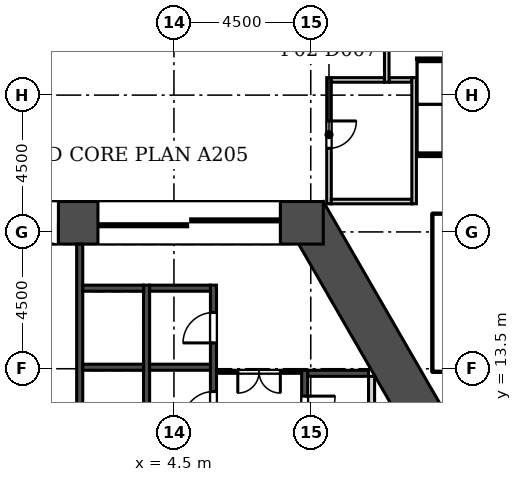
"""IFC4 building model, lengths in metres.
Left out: names, types, materials, properties, quantities, classifications, styles, units other than length and angle.
Written with IfcOpenShell. Run it as: python <this file> out.ifc"""

import sys

from ifc_helpers import new_model, si_unit, direction, frame, frame_2d, origin, place, context, subcontext, project, spatial, rectangle, extrude, element, fill, save


model = new_model("IFC4")
c1 = context("Model", 3, precision=1e-05, world=origin(), true_north=direction((0.0, 1.0)))
c2 = subcontext(c1, "Body", "Model", "MODEL_VIEW")
j1 = project(units=[si_unit("LENGTHUNIT", "METRE"), si_unit("PLANEANGLEUNIT", "RADIAN")], contexts=[c1])
p1 = place(None, origin())
s1 = spatial("IfcSite", under=j1, at=p1, CompositionType="ELEMENT")
p2 = place(p1, origin())
s2 = spatial("IfcBuilding", under=s1, at=p2, CompositionType="ELEMENT")
p3 = place(p2, frame((0.0, 0.0, 14.0)))
s3 = spatial("IfcBuildingStorey", under=s2, at=p3, CompositionType="ELEMENT", Elevation=14.0)
p4 = place(p3, frame((13.394, 10.703, 0.0), z_axis=(0.0, 0.0, 1.0), x_axis=(-0.50000187635, 0.866024320471, 0.0)))
e1 = element("IfcWall", 1, at=p4, inside=s3, PredefinedType="SHEAR", context=c2, shape_type="SweptSolid", body=[
    extrude(rectangle(XDim=9.177, YDim=1.4, at=frame_2d((4.588, 0.0))), origin(), (0.0, 0.0, 1.0), 6.0),
])
p5 = place(p3, frame((9.412, 18.3, 0.0), z_axis=(0.0, 0.0, 1.0), x_axis=(-1.0, 0.0, 0.0)))
e2 = element("IfcWall", 2, at=p5, inside=s3, PredefinedType="SHEAR", context=c2, shape_type="SweptSolid", body=[
    extrude(rectangle(XDim=18.823, YDim=1.4, at=frame_2d((9.412, 0.0))), origin(), (0.0, 0.0, 1.0), 6.0),
])
p6 = place(p5, frame((8.711, 0.0, 0.0)))
e3 = element("IfcOpeningElement", 3, at=p6, cuts=e2, PredefinedType="OPENING", context=c2, shape_type="SweptSolid", body=[
    extrude(rectangle(XDim=1.4, YDim=2.1, at=frame_2d((0.7, 1.05))), frame((0.0, 0.71, 0.0), z_axis=(0.0, -1.0, 0.0), x_axis=(1.0, 0.0, 0.0)), (0.0, 0.0, 1.0), 1.42),
])
p7 = place(p5, frame((11.412, 0.0, 0.0)))
e4 = element("IfcOpeningElement", 4, at=p7, cuts=e2, PredefinedType="OPENING", context=c2, shape_type="SweptSolid", body=[
    extrude(rectangle(XDim=6.0, YDim=2.4, at=frame_2d((3.0, 1.2))), frame((0.0, 0.71, 0.0), z_axis=(0.0, -1.0, 0.0), x_axis=(1.0, 0.0, 0.0)), (0.0, 0.0, 1.0), 1.42),
])
p8 = place(p5, frame((1.412, 0.0, 0.0)))
e5 = element("IfcOpeningElement", 5, at=p8, cuts=e2, PredefinedType="OPENING", context=c2, shape_type="SweptSolid", body=[
    extrude(rectangle(XDim=6.0, YDim=2.4, at=frame_2d((3.0, 1.2))), frame((0.0, 0.71, 0.0), z_axis=(0.0, -1.0, 0.0), x_axis=(1.0, 0.0, 0.0)), (0.0, 0.0, 1.0), 1.42),
])
p9 = place(p3, frame((42.853, 8.575, 0.0), z_axis=(0.0, 0.0, 1.0), x_axis=(-0.49999894854, 0.866026010844, 0.0)))
e6 = element("IfcWall", 6, at=p9, inside=s3, PredefinedType="SOLIDWALL", context=c2, shape_type="SweptSolid", body=[
    extrude(rectangle(XDim=76.0, YDim=0.34, at=frame_2d((38.0, 0.0))), origin(), (0.0, 0.0, 1.0), 5.7),
])
p10 = place(p9, frame((1.058, 0.0, 0.9)))
e7 = element("IfcOpeningElement", 7, at=p10, cuts=e6, PredefinedType="OPENING", context=c2, shape_type="SweptSolid", body=[
    extrude(rectangle(XDim=1.885, YDim=3.5, at=frame_2d((0.942, 1.75))), frame((0.0, 0.18, 0.0), z_axis=(0.0, -1.0, 0.0), x_axis=(1.0, 0.0, 0.0)), (0.0, 0.0, 1.0), 0.36),
])
p11 = place(p9, frame((4.058, 0.0, 0.9)))
e8 = element("IfcOpeningElement", 8, at=p11, cuts=e6, PredefinedType="OPENING", context=c2, shape_type="SweptSolid", body=[
    extrude(rectangle(XDim=1.885, YDim=3.5, at=frame_2d((0.942, 1.75))), frame((0.0, 0.18, 0.0), z_axis=(0.0, -1.0, 0.0), x_axis=(1.0, 0.0, 0.0)), (0.0, 0.0, 1.0), 0.36),
])
p12 = place(p9, frame((7.058, 0.0, 0.9)))
e9 = element("IfcOpeningElement", 9, at=p12, cuts=e6, PredefinedType="OPENING", context=c2, shape_type="SweptSolid", body=[
    extrude(rectangle(XDim=1.885, YDim=3.5, at=frame_2d((0.942, 1.75))), frame((0.0, 0.18, 0.0), z_axis=(0.0, -1.0, 0.0), x_axis=(1.0, 0.0, 0.0)), (0.0, 0.0, 1.0), 0.36),
])
p13 = place(p9, frame((10.058, 0.0, 0.9)))
e10 = element("IfcOpeningElement", 10, at=p13, cuts=e6, PredefinedType="OPENING", context=c2, shape_type="SweptSolid", body=[
    extrude(rectangle(XDim=1.885, YDim=3.5, at=frame_2d((0.942, 1.75))), frame((0.0, 0.18, 0.0), z_axis=(0.0, -1.0, 0.0), x_axis=(1.0, 0.0, 0.0)), (0.0, 0.0, 1.0), 0.36),
])
p14 = place(p9, frame((13.058, 0.0, 0.9)))
e11 = element("IfcOpeningElement", 11, at=p14, cuts=e6, PredefinedType="OPENING", context=c2, shape_type="SweptSolid", body=[
    extrude(rectangle(XDim=1.885, YDim=3.5, at=frame_2d((0.942, 1.75))), frame((0.0, 0.18, 0.0), z_axis=(0.0, -1.0, 0.0), x_axis=(1.0, 0.0, 0.0)), (0.0, 0.0, 1.0), 0.36),
])
p15 = place(p9, frame((16.058, 0.0, 0.9)))
e12 = element("IfcOpeningElement", 12, at=p15, cuts=e6, PredefinedType="OPENING", context=c2, shape_type="SweptSolid", body=[
    extrude(rectangle(XDim=1.885, YDim=3.5, at=frame_2d((0.942, 1.75))), frame((0.0, 0.18, 0.0), z_axis=(0.0, -1.0, 0.0), x_axis=(1.0, 0.0, 0.0)), (0.0, 0.0, 1.0), 0.36),
])
p16 = place(p9, frame((19.058, 0.0, 0.9)))
e13 = element("IfcOpeningElement", 13, at=p16, cuts=e6, PredefinedType="OPENING", context=c2, shape_type="SweptSolid", body=[
    extrude(rectangle(XDim=1.885, YDim=3.5, at=frame_2d((0.942, 1.75))), frame((0.0, 0.18, 0.0), z_axis=(0.0, -1.0, 0.0), x_axis=(1.0, 0.0, 0.0)), (0.0, 0.0, 1.0), 0.36),
])
p17 = place(p9, frame((22.058, 0.0, 0.9)))
e14 = element("IfcOpeningElement", 14, at=p17, cuts=e6, PredefinedType="OPENING", context=c2, shape_type="SweptSolid", body=[
    extrude(rectangle(XDim=1.885, YDim=3.5, at=frame_2d((0.942, 1.75))), frame((0.0, 0.18, 0.0), z_axis=(0.0, -1.0, 0.0), x_axis=(1.0, 0.0, 0.0)), (0.0, 0.0, 1.0), 0.36),
])
p18 = place(p9, frame((25.058, 0.0, 0.9)))
e15 = element("IfcOpeningElement", 15, at=p18, cuts=e6, PredefinedType="OPENING", context=c2, shape_type="SweptSolid", body=[
    extrude(rectangle(XDim=1.885, YDim=3.5, at=frame_2d((0.942, 1.75))), frame((0.0, 0.18, 0.0), z_axis=(0.0, -1.0, 0.0), x_axis=(1.0, 0.0, 0.0)), (0.0, 0.0, 1.0), 0.36),
])
p19 = place(p9, frame((28.058, 0.0, 0.9)))
e16 = element("IfcOpeningElement", 16, at=p19, cuts=e6, PredefinedType="OPENING", context=c2, shape_type="SweptSolid", body=[
    extrude(rectangle(XDim=1.885, YDim=3.5, at=frame_2d((0.942, 1.75))), frame((0.0, 0.18, 0.0), z_axis=(0.0, -1.0, 0.0), x_axis=(1.0, 0.0, 0.0)), (0.0, 0.0, 1.0), 0.36),
])
p20 = place(p9, frame((31.058, 0.0, 0.9)))
e17 = element("IfcOpeningElement", 17, at=p20, cuts=e6, PredefinedType="OPENING", context=c2, shape_type="SweptSolid", body=[
    extrude(rectangle(XDim=1.885, YDim=3.5, at=frame_2d((0.942, 1.75))), frame((0.0, 0.18, 0.0), z_axis=(0.0, -1.0, 0.0), x_axis=(1.0, 0.0, 0.0)), (0.0, 0.0, 1.0), 0.36),
])
p21 = place(p9, frame((34.058, 0.0, 0.9)))
e18 = element("IfcOpeningElement", 18, at=p21, cuts=e6, PredefinedType="OPENING", context=c2, shape_type="SweptSolid", body=[
    extrude(rectangle(XDim=1.885, YDim=3.5, at=frame_2d((0.942, 1.75))), frame((0.0, 0.18, 0.0), z_axis=(0.0, -1.0, 0.0), x_axis=(1.0, 0.0, 0.0)), (0.0, 0.0, 1.0), 0.36),
])
p22 = place(p9, frame((37.058, 0.0, 0.9)))
e19 = element("IfcOpeningElement", 19, at=p22, cuts=e6, PredefinedType="OPENING", context=c2, shape_type="SweptSolid", body=[
    extrude(rectangle(XDim=1.885, YDim=3.5, at=frame_2d((0.942, 1.75))), frame((0.0, 0.18, 0.0), z_axis=(0.0, -1.0, 0.0), x_axis=(1.0, 0.0, 0.0)), (0.0, 0.0, 1.0), 0.36),
])
p23 = place(p9, frame((40.058, 0.0, 0.9)))
e20 = element("IfcOpeningElement", 20, at=p23, cuts=e6, PredefinedType="OPENING", context=c2, shape_type="SweptSolid", body=[
    extrude(rectangle(XDim=1.885, YDim=3.5, at=frame_2d((0.942, 1.75))), frame((0.0, 0.18, 0.0), z_axis=(0.0, -1.0, 0.0), x_axis=(1.0, 0.0, 0.0)), (0.0, 0.0, 1.0), 0.36),
])
p24 = place(p9, frame((43.058, 0.0, 0.9)))
e21 = element("IfcOpeningElement", 21, at=p24, cuts=e6, PredefinedType="OPENING", context=c2, shape_type="SweptSolid", body=[
    extrude(rectangle(XDim=1.885, YDim=3.5, at=frame_2d((0.942, 1.75))), frame((0.0, 0.18, 0.0), z_axis=(0.0, -1.0, 0.0), x_axis=(1.0, 0.0, 0.0)), (0.0, 0.0, 1.0), 0.36),
])
p25 = place(p9, frame((46.058, 0.0, 0.9)))
e22 = element("IfcOpeningElement", 22, at=p25, cuts=e6, PredefinedType="OPENING", context=c2, shape_type="SweptSolid", body=[
    extrude(rectangle(XDim=1.885, YDim=3.5, at=frame_2d((0.942, 1.75))), frame((0.0, 0.18, 0.0), z_axis=(0.0, -1.0, 0.0), x_axis=(1.0, 0.0, 0.0)), (0.0, 0.0, 1.0), 0.36),
])
p26 = place(p9, frame((49.058, 0.0, 0.9)))
e23 = element("IfcOpeningElement", 23, at=p26, cuts=e6, PredefinedType="OPENING", context=c2, shape_type="SweptSolid", body=[
    extrude(rectangle(XDim=1.885, YDim=3.5, at=frame_2d((0.942, 1.75))), frame((0.0, 0.18, 0.0), z_axis=(0.0, -1.0, 0.0), x_axis=(1.0, 0.0, 0.0)), (0.0, 0.0, 1.0), 0.36),
])
p27 = place(p9, frame((52.058, 0.0, 0.9)))
e24 = element("IfcOpeningElement", 24, at=p27, cuts=e6, PredefinedType="OPENING", context=c2, shape_type="SweptSolid", body=[
    extrude(rectangle(XDim=1.885, YDim=3.5, at=frame_2d((0.942, 1.75))), frame((0.0, 0.18, 0.0), z_axis=(0.0, -1.0, 0.0), x_axis=(1.0, 0.0, 0.0)), (0.0, 0.0, 1.0), 0.36),
])
p28 = place(p9, frame((55.058, 0.0, 0.9)))
e25 = element("IfcOpeningElement", 25, at=p28, cuts=e6, PredefinedType="OPENING", context=c2, shape_type="SweptSolid", body=[
    extrude(rectangle(XDim=1.885, YDim=3.5, at=frame_2d((0.942, 1.75))), frame((0.0, 0.18, 0.0), z_axis=(0.0, -1.0, 0.0), x_axis=(1.0, 0.0, 0.0)), (0.0, 0.0, 1.0), 0.36),
])
p29 = place(p9, frame((58.058, 0.0, 0.9)))
e26 = element("IfcOpeningElement", 26, at=p29, cuts=e6, PredefinedType="OPENING", context=c2, shape_type="SweptSolid", body=[
    extrude(rectangle(XDim=1.885, YDim=3.5, at=frame_2d((0.942, 1.75))), frame((0.0, 0.18, 0.0), z_axis=(0.0, -1.0, 0.0), x_axis=(1.0, 0.0, 0.0)), (0.0, 0.0, 1.0), 0.36),
])
p30 = place(p9, frame((61.058, 0.0, 0.9)))
e27 = element("IfcOpeningElement", 27, at=p30, cuts=e6, PredefinedType="OPENING", context=c2, shape_type="SweptSolid", body=[
    extrude(rectangle(XDim=1.885, YDim=3.5, at=frame_2d((0.942, 1.75))), frame((0.0, 0.18, 0.0), z_axis=(0.0, -1.0, 0.0), x_axis=(1.0, 0.0, 0.0)), (0.0, 0.0, 1.0), 0.36),
])
p31 = place(p9, frame((64.058, 0.0, 0.9)))
e28 = element("IfcOpeningElement", 28, at=p31, cuts=e6, PredefinedType="OPENING", context=c2, shape_type="SweptSolid", body=[
    extrude(rectangle(XDim=1.885, YDim=3.5, at=frame_2d((0.942, 1.75))), frame((0.0, 0.18, 0.0), z_axis=(0.0, -1.0, 0.0), x_axis=(1.0, 0.0, 0.0)), (0.0, 0.0, 1.0), 0.36),
])
p32 = place(p9, frame((67.058, 0.0, 0.9)))
e29 = element("IfcOpeningElement", 29, at=p32, cuts=e6, PredefinedType="OPENING", context=c2, shape_type="SweptSolid", body=[
    extrude(rectangle(XDim=1.885, YDim=3.5, at=frame_2d((0.942, 1.75))), frame((0.0, 0.18, 0.0), z_axis=(0.0, -1.0, 0.0), x_axis=(1.0, 0.0, 0.0)), (0.0, 0.0, 1.0), 0.36),
])
p33 = place(p9, frame((70.058, 0.0, 0.9)))
e30 = element("IfcOpeningElement", 30, at=p33, cuts=e6, PredefinedType="OPENING", context=c2, shape_type="SweptSolid", body=[
    extrude(rectangle(XDim=1.885, YDim=3.5, at=frame_2d((0.942, 1.75))), frame((0.0, 0.18, 0.0), z_axis=(0.0, -1.0, 0.0), x_axis=(1.0, 0.0, 0.0)), (0.0, 0.0, 1.0), 0.36),
])
p34 = place(p9, frame((73.058, 0.0, 0.9)))
e31 = element("IfcOpeningElement", 31, at=p34, cuts=e6, PredefinedType="OPENING", context=c2, shape_type="SweptSolid", body=[
    extrude(rectangle(XDim=1.885, YDim=3.5, at=frame_2d((0.942, 1.75))), frame((0.0, 0.18, 0.0), z_axis=(0.0, -1.0, 0.0), x_axis=(1.0, 0.0, 0.0)), (0.0, 0.0, 1.0), 0.36),
])
p35 = place(p3, frame((11.0, 5.85, 0.0), z_axis=(0.0, 0.0, 1.0), x_axis=(0.0, 1.0, 0.0)))
e32 = element("IfcWall", 32, at=p35, inside=s3, PredefinedType="SOLIDWALL", context=c2, shape_type="SweptSolid", body=[
    extrude(rectangle(XDim=7.4, YDim=0.2, at=frame_2d((3.7, 0.0))), origin(), (0.0, 0.0, 1.0), 5.7),
])
p36 = place(p3, frame((8.8, 8.25, -0.3), z_axis=(0.0, 0.0, 1.0), x_axis=(0.0, 1.0, 0.0)))
e33 = element("IfcWall", 33, at=p36, inside=s3, PredefinedType="SOLIDWALL", context=c2, shape_type="SweptSolid", body=[
    extrude(rectangle(XDim=5.2, YDim=0.2, at=frame_2d((2.6, 0.0))), origin(), (0.0, 0.0, 1.0), 6.0),
])
p37 = place(p36, frame((0.85, 0.0, 0.3)))
e34 = element("IfcOpeningElement", 34, at=p37, cuts=e33, PredefinedType="OPENING", context=c2, shape_type="SweptSolid", body=[
    extrude(rectangle(XDim=1.0, YDim=2.1, at=frame_2d((0.5, 1.05))), frame((0.0, 0.11, 0.0), z_axis=(0.0, -1.0, 0.0), x_axis=(1.0, 0.0, 0.0)), (0.0, 0.0, 1.0), 0.22),
])
p38 = place(p36, frame((3.35, 0.0, 0.3)))
e35 = element("IfcOpeningElement", 35, at=p38, cuts=e33, PredefinedType="OPENING", context=c2, shape_type="SweptSolid", body=[
    extrude(rectangle(XDim=1.0, YDim=2.1, at=frame_2d((0.5, 1.05))), frame((0.0, 0.11, 0.0), z_axis=(0.0, -1.0, 0.0), x_axis=(1.0, 0.0, 0.0)), (0.0, 0.0, 1.0), 0.22),
])
p39 = place(p3, frame((5.8, 8.25, -0.3), z_axis=(0.0, 0.0, 1.0), x_axis=(0.0, 1.0, 0.0)))
e36 = element("IfcWall", 36, at=p39, inside=s3, PredefinedType="SOLIDWALL", context=c2, shape_type="SweptSolid", body=[
    extrude(rectangle(XDim=8.0, YDim=0.2, at=frame_2d((4.0, 0.0))), origin(), (0.0, 0.0, 1.0), 6.0),
])
p40 = place(p39, frame((0.9, 0.0, 0.3)))
e37 = element("IfcOpeningElement", 37, at=p40, cuts=e36, PredefinedType="OPENING", context=c2, shape_type="SweptSolid", body=[
    extrude(rectangle(XDim=1.0, YDim=2.1, at=frame_2d((0.5, 1.05))), frame((0.0, 0.11, 0.0), z_axis=(0.0, -1.0, 0.0), x_axis=(1.0, 0.0, 0.0)), (0.0, 0.0, 1.0), 0.22),
])
p41 = place(p39, frame((3.5, 0.0, 0.3)))
e38 = element("IfcOpeningElement", 38, at=p41, cuts=e36, PredefinedType="OPENING", context=c2, shape_type="SweptSolid", body=[
    extrude(rectangle(XDim=1.0, YDim=2.1, at=frame_2d((0.5, 1.05))), frame((0.0, 0.11, 0.0), z_axis=(0.0, -1.0, 0.0), x_axis=(1.0, 0.0, 0.0)), (0.0, 0.0, 1.0), 0.22),
])
p42 = place(p39, frame((6.1, 0.0, 0.3)))
e39 = element("IfcOpeningElement", 39, at=p42, cuts=e36, PredefinedType="OPENING", context=c2, shape_type="SweptSolid", body=[
    extrude(rectangle(XDim=1.0, YDim=2.1, at=frame_2d((0.5, 1.05))), frame((0.0, 0.11, 0.0), z_axis=(0.0, -1.0, 0.0), x_axis=(1.0, 0.0, 0.0)), (0.0, 0.0, 1.0), 0.22),
])
p43 = place(p3, frame((3.6, 8.45, -0.3), z_axis=(0.0, 0.0, 1.0), x_axis=(0.0, 1.0, 0.0)))
e40 = element("IfcWall", 40, at=p43, inside=s3, PredefinedType="SOLIDWALL", context=c2, shape_type="SweptSolid", body=[
    extrude(rectangle(XDim=7.8, YDim=0.2, at=frame_2d((3.9, 0.0))), origin(), (0.0, 0.0, 1.0), 6.0),
])
p44 = place(p3, frame((1.4, 5.85, -0.3), z_axis=(0.0, 0.0, 1.0), x_axis=(0.0, 1.0, 0.0)))
e41 = element("IfcWall", 41, at=p44, inside=s3, PredefinedType="SOLIDWALL", context=c2, shape_type="SweptSolid", body=[
    extrude(rectangle(XDim=11.75, YDim=0.2, at=frame_2d((5.875, 0.0))), origin(), (0.0, 0.0, 1.0), 6.0),
])
p45 = place(p44, frame((0.65, 0.0, 0.3)))
e42 = element("IfcOpeningElement", 42, at=p45, cuts=e41, PredefinedType="OPENING", context=c2, shape_type="SweptSolid", body=[
    extrude(rectangle(XDim=1.1, YDim=2.1, at=frame_2d((0.55, 1.05))), frame((0.0, 0.11, 0.0), z_axis=(0.0, -1.0, 0.0), x_axis=(1.0, 0.0, 0.0)), (0.0, 0.0, 1.0), 0.22),
])
p46 = place(p44, frame((3.3, 0.0, 0.3)))
e43 = element("IfcOpeningElement", 43, at=p46, cuts=e41, PredefinedType="OPENING", context=c2, shape_type="SweptSolid", body=[
    extrude(rectangle(XDim=1.0, YDim=2.1, at=frame_2d((0.5, 1.05))), frame((0.0, 0.11, 0.0), z_axis=(0.0, -1.0, 0.0), x_axis=(1.0, 0.0, 0.0)), (0.0, 0.0, 1.0), 0.22),
])
for number, where, z_axis, x_axis in (
    (44, (8.9, 13.35, -0.3), (0.0, 0.0, 1.0), (1.0, 0.0, 0.0)),
    (45, (3.7, 13.55, -0.3), (0.0, 0.0, 1.0), (1.0, 0.0, 0.0)),
    (46, (3.7, 16.15, -0.3), (0.0, 0.0, 1.0), (1.0, 0.0, 0.0)),
    (47, (1.5, 13.55, -0.3), (0.0, 0.0, 1.0), (1.0, 0.0, 0.0)),
    (48, (1.5, 16.15, -0.3), (0.0, 0.0, 1.0), (1.0, 0.0, 0.0)),
):
    element("IfcWall", number, at=place(p3, frame(where, z_axis=z_axis, x_axis=x_axis)), inside=s3, PredefinedType="SOLIDWALL", context=c2, shape_type="SweptSolid", body=[
        extrude(rectangle(XDim=2.0, YDim=0.2, at=frame_2d((1.0, 0.0))), origin(), (0.0, 0.0, 1.0), 6.0),
    ])
p47 = place(p3, frame((5.9, 13.4, 0.0), z_axis=(0.0, 0.0, 1.0), x_axis=(1.0, 0.0, 0.0)))
e49 = element("IfcWall", 49, at=p47, inside=s3, PredefinedType="PARTITIONING", context=c2, shape_type="SweptSolid", body=[
    extrude(rectangle(XDim=2.8, YDim=0.1, at=frame_2d((1.4, 0.0))), origin(), (0.0, 0.0, 1.0), 5.7),
])
p48 = place(p47, frame((0.7, 0.0, 0.0)))
e50 = element("IfcOpeningElement", 50, at=p48, cuts=e49, PredefinedType="OPENING", context=c2, shape_type="SweptSolid", body=[
    extrude(rectangle(XDim=1.4, YDim=2.1, at=frame_2d((0.7, 1.05))), frame((0.0, 0.06, 0.0), z_axis=(0.0, -1.0, 0.0), x_axis=(1.0, 0.0, 0.0)), (0.0, 0.0, 1.0), 0.12),
])
p49 = place(p3, frame((9.6, 18.925, 0.0), z_axis=(0.0, 0.0, 1.0), x_axis=(0.0, 1.0, 0.0)))
e51 = element("IfcWall", 51, at=p49, inside=s3, PredefinedType="PARTITIONING", context=c2, shape_type="SweptSolid", body=[
    extrude(rectangle(XDim=4.15, YDim=0.15, at=frame_2d((2.075, 0.0))), origin(), (0.0, 0.0, 1.0), 5.7),
])
p50 = place(p49, frame((1.825, 0.0, 0.0)))
e52 = element("IfcOpeningElement", 52, at=p50, cuts=e51, PredefinedType="OPENING", context=c2, shape_type="SweptSolid", body=[
    extrude(rectangle(XDim=0.9, YDim=2.1, at=frame_2d((0.45, 1.05))), frame((0.0, 0.085, 0.0), z_axis=(0.0, -1.0, 0.0), x_axis=(1.0, 0.0, 0.0)), (0.0, 0.0, 1.0), 0.17),
])
p51 = place(p3, frame((12.325, 19.0, 0.0), z_axis=(0.0, 0.0, 1.0), x_axis=(-1.0, 0.0, 0.0)))
e53 = element("IfcWall", 53, at=p51, inside=s3, PredefinedType="PARTITIONING", context=c2, shape_type="SweptSolid", body=[
    extrude(rectangle(XDim=2.65, YDim=0.15, at=frame_2d((1.325, 0.0))), origin(), (0.0, 0.0, 1.0), 5.7),
])
p52 = place(p3, frame((9.675, 23.0, 0.0), z_axis=(0.0, 0.0, 1.0), x_axis=(1.0, 0.0, 0.0)))
e54 = element("IfcWall", 54, at=p52, inside=s3, PredefinedType="PARTITIONING", context=c2, shape_type="SweptSolid", body=[
    extrude(rectangle(XDim=1.75, YDim=0.15, at=frame_2d((0.875, 0.0))), origin(), (0.0, 0.0, 1.0), 5.7),
])
p53 = place(p3, frame((11.575, 23.0, 0.0), z_axis=(0.0, 0.0, 1.0), x_axis=(1.0, 0.0, 0.0)))
e55 = element("IfcWall", 55, at=p53, inside=s3, PredefinedType="PARTITIONING", context=c2, shape_type="SweptSolid", body=[
    extrude(rectangle(XDim=0.75, YDim=0.15, at=frame_2d((0.375, 0.0))), origin(), (0.0, 0.0, 1.0), 5.7),
])
p54 = place(p3, frame((12.4, 23.075, 0.0), z_axis=(0.0, 0.0, 1.0), x_axis=(0.0, -1.0, 0.0)))
e56 = element("IfcWall", 56, at=p54, inside=s3, PredefinedType="PARTITIONING", context=c2, shape_type="SweptSolid", body=[
    extrude(rectangle(XDim=4.15, YDim=0.15, at=frame_2d((2.075, 0.0))), origin(), (0.0, 0.0, 1.0), 5.7),
])
p55 = place(p3, frame((11.5, 28.685, 0.0), z_axis=(0.0, 0.0, 1.0), x_axis=(0.0, -1.0, 0.0)))
e57 = element("IfcWall", 57, at=p55, inside=s3, PredefinedType="PARTITIONING", context=c2, shape_type="SweptSolid", body=[
    extrude(rectangle(XDim=5.76, YDim=0.15, at=frame_2d((2.88, 0.0))), origin(), (0.0, 0.0, 1.0), 5.7),
])
p56 = place(p55, frame((1.185, 0.0, 0.0)))
e58 = element("IfcOpeningElement", 58, at=p56, cuts=e57, PredefinedType="OPENING", context=c2, shape_type="SweptSolid", body=[
    extrude(rectangle(XDim=3.0, YDim=2.4, at=frame_2d((1.5, 1.2))), frame((0.0, 0.085, 0.0), z_axis=(0.0, -1.0, 0.0), x_axis=(1.0, 0.0, 0.0)), (0.0, 0.0, 1.0), 0.17),
])
p57 = place(p3, frame((13.125, 13.45, 0.0), z_axis=(0.0, 0.0, 1.0), x_axis=(0.0, 1.0, 0.0)))
e59 = element("IfcWall", 59, at=p57, inside=s3, PredefinedType="SOLIDWALL", context=c2, shape_type="SweptSolid", body=[
    extrude(rectangle(XDim=5.1, YDim=0.25, at=frame_2d((2.55, 0.0))), origin(), (0.0, 0.0, 1.0), 2.8),
])
for number, where, z_axis, x_axis in (
    (60, (13.125, 13.525, 0.0), (0.0, 0.0, 1.0), (1.0, 0.0, 0.0)),
    (61, (13.125, 18.475, 0.0), (0.0, 0.0, 1.0), (1.0, 0.0, 0.0)),
):
    element("IfcWall", number, at=place(p3, frame(where, z_axis=z_axis, x_axis=x_axis)), inside=s3, PredefinedType="SOLIDWALL", context=c2, shape_type="SweptSolid", body=[
        extrude(rectangle(XDim=2.31, YDim=0.25, at=frame_2d((1.155, 0.0))), origin(), (0.0, 0.0, 1.0), 2.8),
    ])
p58 = place(p38, frame((1.0, 0.0, 0.0), z_axis=(0.0, 0.0, 1.0), x_axis=(-1.0, 0.0, 0.0)))
e62 = element("IfcDoor", 62, at=p58, inside=s3, OperationType="SINGLE_SWING_LEFT", PredefinedType="DOOR", context=c2, shape_type="SweptSolid", body=[
    extrude(rectangle(XDim=1.0, YDim=2.1, at=frame_2d((0.5, 1.05))), frame((0.0, 0.025, 0.0), z_axis=(0.0, -1.0, 0.0), x_axis=(1.0, 0.0, 0.0)), (0.0, 0.0, 1.0), 0.05),
])
fill(e35, e62)
p59 = place(p41, origin())
e63 = element("IfcDoor", 63, at=p59, inside=s3, OperationType="SINGLE_SWING_LEFT", PredefinedType="DOOR", context=c2, shape_type="SweptSolid", body=[
    extrude(rectangle(XDim=1.0, YDim=2.1, at=frame_2d((0.5, 1.05))), frame((0.0, 0.025, 0.0), z_axis=(0.0, -1.0, 0.0), x_axis=(1.0, 0.0, 0.0)), (0.0, 0.0, 1.0), 0.05),
])
fill(e38, e63)
p60 = place(p42, origin())
e64 = element("IfcDoor", 64, at=p60, inside=s3, OperationType="SINGLE_SWING_LEFT", PredefinedType="DOOR", context=c2, shape_type="SweptSolid", body=[
    extrude(rectangle(XDim=1.0, YDim=2.1, at=frame_2d((0.5, 1.05))), frame((0.0, 0.025, 0.0), z_axis=(0.0, -1.0, 0.0), x_axis=(1.0, 0.0, 0.0)), (0.0, 0.0, 1.0), 0.05),
])
fill(e39, e64)
p61 = place(p48, frame((1.4, 0.0, 0.0), z_axis=(0.0, 0.0, 1.0), x_axis=(-1.0, 0.0, 0.0)))
e65 = element("IfcDoor", 65, at=p61, inside=s3, OperationType="DOUBLE_DOOR_SINGLE_SWING", PredefinedType="DOOR", context=c2, shape_type="SweptSolid", body=[
    extrude(rectangle(XDim=1.4, YDim=2.1, at=frame_2d((0.7, 1.05))), frame((0.0, 0.025, 0.0), z_axis=(0.0, -1.0, 0.0), x_axis=(1.0, 0.0, 0.0)), (0.0, 0.0, 1.0), 0.05),
])
fill(e50, e65)
p62 = place(p6, origin())
e66 = element("IfcDoor", 66, at=p62, inside=s3, OperationType="DOUBLE_DOOR_SINGLE_SWING", PredefinedType="DOOR", context=c2, shape_type="SweptSolid", body=[
    extrude(rectangle(XDim=1.4, YDim=2.1, at=frame_2d((0.7, 1.05))), frame((0.0, 0.025, 0.0), z_axis=(0.0, -1.0, 0.0), x_axis=(1.0, 0.0, 0.0)), (0.0, 0.0, 1.0), 0.05),
])
fill(e3, e66)
p63 = place(p8, origin())
e67 = element("IfcDoor", 67, at=p63, inside=s3, OperationType="DOUBLE_DOOR_SLIDING", PredefinedType="DOOR", context=c2, shape_type="SweptSolid", body=[
    extrude(rectangle(XDim=6.0, YDim=2.4, at=frame_2d((3.0, 1.2))), frame((0.0, 0.025, 0.0), z_axis=(0.0, -1.0, 0.0), x_axis=(1.0, 0.0, 0.0)), (0.0, 0.0, 1.0), 0.05),
])
fill(e5, e67)
p64 = place(p50, frame((0.9, 0.0, 0.0), z_axis=(0.0, 0.0, 1.0), x_axis=(-1.0, 0.0, 0.0)))
e68 = element("IfcDoor", 68, at=p64, inside=s3, OperationType="SINGLE_SWING_LEFT", PredefinedType="DOOR", context=c2, shape_type="SweptSolid", body=[
    extrude(rectangle(XDim=0.9, YDim=2.1, at=frame_2d((0.45, 1.05))), frame((0.0, 0.025, 0.0), z_axis=(0.0, -1.0, 0.0), x_axis=(1.0, 0.0, 0.0)), (0.0, 0.0, 1.0), 0.05),
])
fill(e52, e68)
save(model, sys.argv[1])
